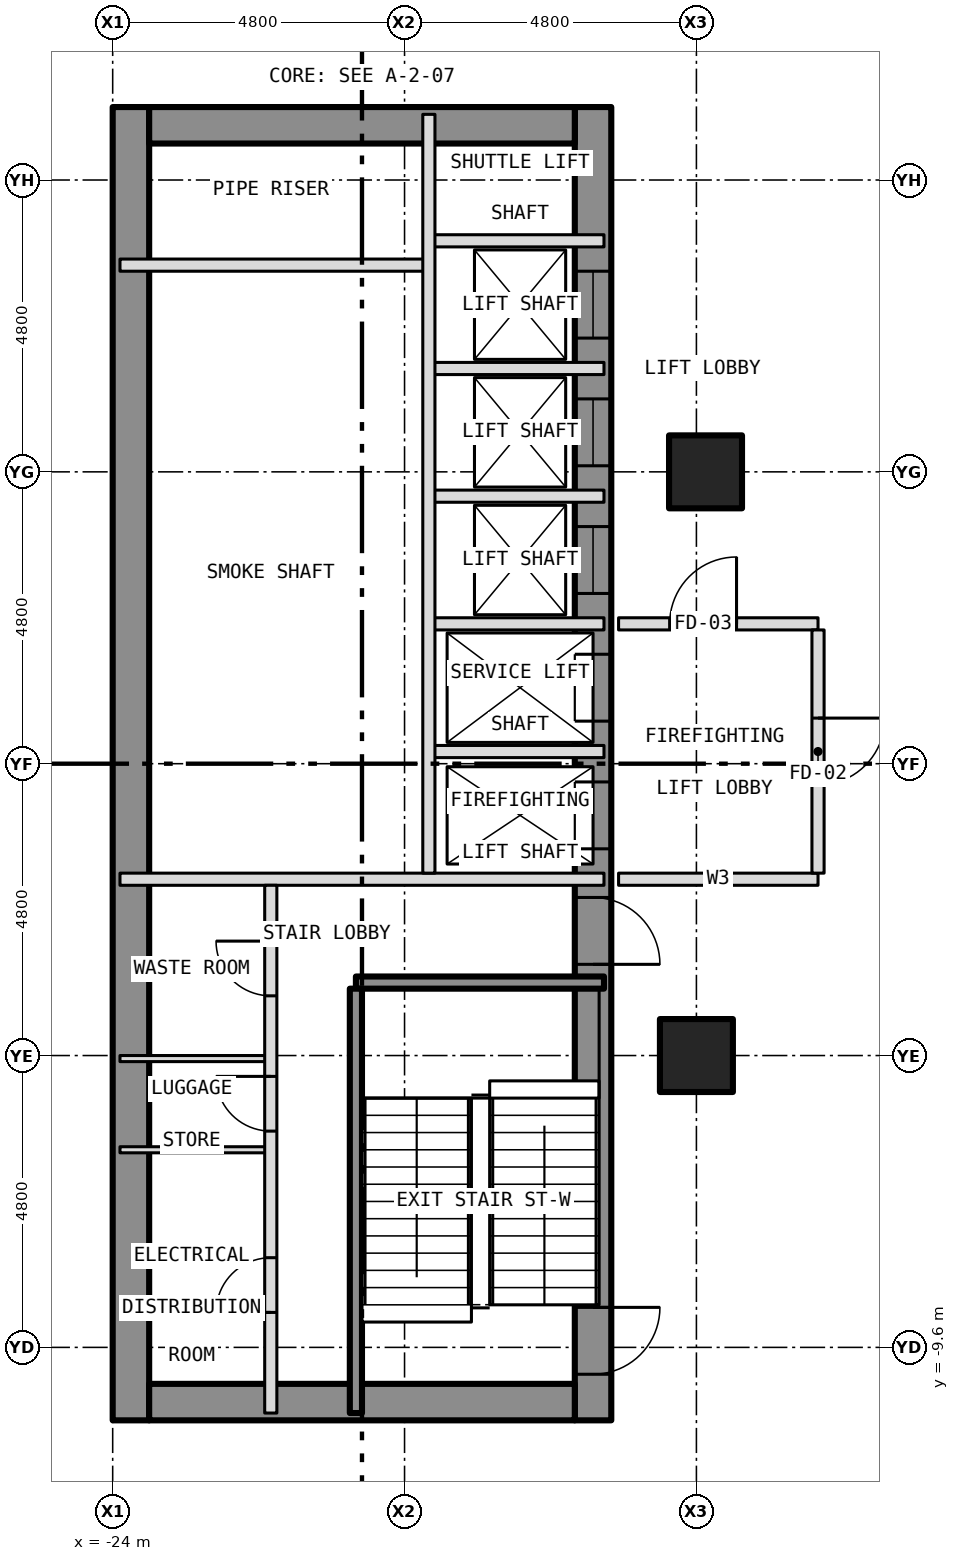
"""IFC4 building model, lengths in metres.
Left out: names, types, materials, properties, quantities, classifications, styles, units other than length and angle.
Written with IfcOpenShell. Run it as: python <this file> out.ifc"""

import sys

from ifc_helpers import new_model, si_unit, direction, frame, frame_2d, origin, origin_2d, place, context, subcontext, project, spatial, rectangle, hollow_rectangle, extrude, element, fill, save


model = new_model("IFC4")
c1 = context("Model", 3, precision=1e-05, world=origin(), true_north=direction((0.0, 1.0)))
c2 = subcontext(c1, "Body", "Model", "MODEL_VIEW")
j1 = project(units=[si_unit("LENGTHUNIT", "METRE"), si_unit("PLANEANGLEUNIT", "RADIAN")], contexts=[c1])
p1 = place(None, origin())
s1 = spatial("IfcSite", under=j1, at=p1, CompositionType="ELEMENT")
p2 = place(p1, origin())
s2 = spatial("IfcBuilding", under=s1, at=p2, CompositionType="ELEMENT")
p3 = place(p2, frame((0.0, 0.0, 24.5)))
s3 = spatial("IfcBuildingStorey", under=s2, at=p3, CompositionType="ELEMENT", Elevation=24.5)
for number, where, z_axis, x_axis in (
    (1, (-14.4, -4.8, -0.2), (0.0, 0.0, 1.0), (1.0, 0.0, 0.0)),
    (2, (-14.25, 4.8, -0.2), (0.0, 0.0, 1.0), (1.0, 0.0, 0.0)),
):
    element("IfcColumn", number, at=place(p3, frame(where, z_axis=z_axis, x_axis=x_axis)), inside=s3, PredefinedType="COLUMN", context=c2, shape_type="SweptSolid", body=[
        extrude(hollow_rectangle(XDim=1.2, YDim=1.2, WallThickness=0.07, at=origin_2d()), origin(), (0.0, 0.0, 1.0), 4.5),
    ])
p4 = place(p3, frame((-16.1, -10.8, 0.0), z_axis=(0.0, 0.0, 1.0), x_axis=(0.0, 1.0, 0.0)))
e3 = element("IfcWall", 3, at=p4, inside=s3, PredefinedType="SHEAR", context=c2, shape_type="SweptSolid", body=[
    extrude(rectangle(XDim=21.6, YDim=0.6, at=frame_2d((10.8, 0.0))), origin(), (0.0, 0.0, 1.0), 4.2),
])
p5 = place(p4, frame((9.4, 0.0, 0.0)))
e4 = element("IfcOpeningElement", 4, at=p5, cuts=e3, PredefinedType="OPENING", context=c2, shape_type="SweptSolid", body=[
    extrude(rectangle(XDim=1.1, YDim=2.1, at=frame_2d((0.55, 1.05))), frame((0.0, 0.312, 0.0), z_axis=(0.0, -1.0, 0.0), x_axis=(1.0, 0.0, 0.0)), (0.0, 0.0, 1.0), 0.624),
])
p6 = place(p4, frame((11.5, 0.0, 0.0)))
e5 = element("IfcOpeningElement", 5, at=p6, cuts=e3, PredefinedType="OPENING", context=c2, shape_type="SweptSolid", body=[
    extrude(rectangle(XDim=1.1, YDim=2.1, at=frame_2d((0.55, 1.05))), frame((0.0, 0.312, 0.0), z_axis=(0.0, -1.0, 0.0), x_axis=(1.0, 0.0, 0.0)), (0.0, 0.0, 1.0), 0.624),
])
p7 = place(p4, frame((13.6, 0.0, 0.0)))
e6 = element("IfcOpeningElement", 6, at=p7, cuts=e3, PredefinedType="OPENING", context=c2, shape_type="SweptSolid", body=[
    extrude(rectangle(XDim=1.1, YDim=2.1, at=frame_2d((0.55, 1.05))), frame((0.0, 0.312, 0.0), z_axis=(0.0, -1.0, 0.0), x_axis=(1.0, 0.0, 0.0)), (0.0, 0.0, 1.0), 0.624),
])
p8 = place(p4, frame((15.7, 0.0, 0.0)))
e7 = element("IfcOpeningElement", 7, at=p8, cuts=e3, PredefinedType="OPENING", context=c2, shape_type="SweptSolid", body=[
    extrude(rectangle(XDim=1.1, YDim=2.1, at=frame_2d((0.55, 1.05))), frame((0.0, 0.312, 0.0), z_axis=(0.0, -1.0, 0.0), x_axis=(1.0, 0.0, 0.0)), (0.0, 0.0, 1.0), 0.624),
])
p9 = place(p4, frame((17.8, 0.0, 0.0)))
e8 = element("IfcOpeningElement", 8, at=p9, cuts=e3, PredefinedType="OPENING", context=c2, shape_type="SweptSolid", body=[
    extrude(rectangle(XDim=1.1, YDim=2.1, at=frame_2d((0.55, 1.05))), frame((0.0, 0.312, 0.0), z_axis=(0.0, -1.0, 0.0), x_axis=(1.0, 0.0, 0.0)), (0.0, 0.0, 1.0), 0.624),
])
p10 = place(p4, frame((0.758, 0.0, 0.0)))
e9 = element("IfcOpeningElement", 9, at=p10, cuts=e3, PredefinedType="OPENING", context=c2, shape_type="SweptSolid", body=[
    extrude(rectangle(XDim=1.1, YDim=2.1, at=frame_2d((0.55, 1.05))), frame((0.0, 0.312, 0.0), z_axis=(0.0, -1.0, 0.0), x_axis=(1.0, 0.0, 0.0)), (0.0, 0.0, 1.0), 0.624),
])
p11 = place(p4, frame((7.5, 0.0, 0.0)))
e10 = element("IfcOpeningElement", 10, at=p11, cuts=e3, PredefinedType="OPENING", context=c2, shape_type="SweptSolid", body=[
    extrude(rectangle(XDim=1.1, YDim=2.1, at=frame_2d((0.55, 1.05))), frame((0.0, 0.312, 0.0), z_axis=(0.0, -1.0, 0.0), x_axis=(1.0, 0.0, 0.0)), (0.0, 0.0, 1.0), 0.624),
])
p12 = place(p3, frame((-23.7, -10.8, 0.0), z_axis=(0.0, 0.0, 1.0), x_axis=(0.0, 1.0, 0.0)))
e11 = element("IfcWall", 11, at=p12, inside=s3, PredefinedType="SHEAR", context=c2, shape_type="SweptSolid", body=[
    extrude(rectangle(XDim=21.6, YDim=0.6, at=frame_2d((10.8, 0.0))), origin(), (0.0, 0.0, 1.0), 4.2),
])
for number, where, z_axis, x_axis in (
    (12, (-23.4, 10.5, 0.0), (0.0, 0.0, 1.0), (1.0, 0.0, 0.0)),
    (13, (-23.4, -10.5, 0.0), (0.0, 0.0, 1.0), (1.0, 0.0, 0.0)),
):
    element("IfcWall", number, at=place(p3, frame(where, z_axis=z_axis, x_axis=x_axis)), inside=s3, PredefinedType="SHEAR", context=c2, shape_type="SweptSolid", body=[
        extrude(rectangle(XDim=7.0, YDim=0.6, at=frame_2d((3.5, 0.0))), origin(), (0.0, 0.0, 1.0), 4.2),
    ])
for number, where, z_axis, x_axis in (
    (14, (-23.88, -6.35, 0.0), (0.0, 0.0, 1.0), (1.0, 0.0, 0.0)),
    (15, (-23.88, -4.85, 0.0), (0.0, 0.0, 1.0), (1.0, 0.0, 0.0)),
):
    element("IfcWall", number, at=place(p3, frame(where, z_axis=z_axis, x_axis=x_axis)), inside=s3, PredefinedType="PARTITIONING", context=c2, shape_type="SweptSolid", body=[
        extrude(rectangle(XDim=2.48, YDim=0.1, at=frame_2d((1.24, 0.0))), origin(), (0.0, 0.0, 1.0), 4.2),
    ])
p13 = place(p3, frame((-20.0, -3.6, 0.0), z_axis=(0.0, 0.0, 1.0), x_axis=(1.0, 0.0, 0.0)))
e16 = element("IfcWall", 16, at=p13, inside=s3, PredefinedType="SHEAR", context=c2, shape_type="SweptSolid", body=[
    extrude(rectangle(XDim=4.08, YDim=0.2, at=frame_2d((2.04, 0.0))), origin(), (0.0, 0.0, 1.0), 4.2),
])
p14 = place(p3, frame((-23.88, -1.9, 0.0), z_axis=(0.0, 0.0, 1.0), x_axis=(1.0, 0.0, 0.0)))
e17 = element("IfcWall", 17, at=p14, inside=s3, PredefinedType="PARTITIONING", context=c2, shape_type="SweptSolid", body=[
    extrude(rectangle(XDim=7.96, YDim=0.2, at=frame_2d((3.98, 0.0))), origin(), (0.0, 0.0, 1.0), 4.2),
])
p15 = place(p3, frame((-15.68, -1.9, 0.0), z_axis=(0.0, 0.0, 1.0), x_axis=(1.0, 0.0, 0.0)))
e18 = element("IfcWall", 18, at=p15, inside=s3, PredefinedType="PARTITIONING", context=c2, shape_type="SweptSolid", body=[
    extrude(rectangle(XDim=3.28, YDim=0.2, at=frame_2d((1.64, 0.0))), origin(), (0.0, 0.0, 1.0), 4.3),
])
for number, where, z_axis, x_axis in (
    (19, (-18.8, 0.2, 0.0), (0.0, 0.0, 1.0), (1.0, 0.0, 0.0)),
    (20, (-18.8, 2.3, 0.0), (0.0, 0.0, 1.0), (1.0, 0.0, 0.0)),
):
    element("IfcWall", number, at=place(p3, frame(where, z_axis=z_axis, x_axis=x_axis)), inside=s3, PredefinedType="PARTITIONING", context=c2, shape_type="SweptSolid", body=[
        extrude(rectangle(XDim=2.88, YDim=0.2, at=frame_2d((1.44, 0.0))), origin(), (0.0, 0.0, 1.0), 4.2),
    ])
p16 = place(p3, frame((-15.68, 2.3, 0.0), z_axis=(0.0, 0.0, 1.0), x_axis=(1.0, 0.0, 0.0)))
e21 = element("IfcWall", 21, at=p16, inside=s3, PredefinedType="PARTITIONING", context=c2, shape_type="SweptSolid", body=[
    extrude(rectangle(XDim=3.28, YDim=0.2, at=frame_2d((1.64, 0.0))), origin(), (0.0, 0.0, 1.0), 4.3),
])
p17 = place(p16, frame((0.84, 0.0, 0.0)))
e22 = element("IfcOpeningElement", 22, at=p17, cuts=e21, PredefinedType="OPENING", context=c2, shape_type="SweptSolid", body=[
    extrude(rectangle(XDim=1.1, YDim=2.1, at=frame_2d((0.55, 1.05))), frame((0.0, 0.112, 0.0), z_axis=(0.0, -1.0, 0.0), x_axis=(1.0, 0.0, 0.0)), (0.0, 0.0, 1.0), 0.224),
])
for number, where, z_axis, x_axis in (
    (23, (-18.8, 4.4, 0.0), (0.0, 0.0, 1.0), (1.0, 0.0, 0.0)),
    (24, (-18.8, 6.5, 0.0), (0.0, 0.0, 1.0), (1.0, 0.0, 0.0)),
):
    element("IfcWall", number, at=place(p3, frame(where, z_axis=z_axis, x_axis=x_axis)), inside=s3, PredefinedType="PARTITIONING", context=c2, shape_type="SweptSolid", body=[
        extrude(rectangle(XDim=2.88, YDim=0.2, at=frame_2d((1.44, 0.0))), origin(), (0.0, 0.0, 1.0), 4.2),
    ])
p18 = place(p3, frame((-23.88, 8.2, 0.0), z_axis=(0.0, 0.0, 1.0), x_axis=(1.0, 0.0, 0.0)))
e25 = element("IfcWall", 25, at=p18, inside=s3, PredefinedType="PARTITIONING", context=c2, shape_type="SweptSolid", body=[
    extrude(rectangle(XDim=5.08, YDim=0.2, at=frame_2d((2.54, 0.0))), origin(), (0.0, 0.0, 1.0), 4.2),
])
p19 = place(p3, frame((-18.8, 8.6, 0.0), z_axis=(0.0, 0.0, 1.0), x_axis=(1.0, 0.0, 0.0)))
e26 = element("IfcWall", 26, at=p19, inside=s3, PredefinedType="PARTITIONING", context=c2, shape_type="SweptSolid", body=[
    extrude(rectangle(XDim=2.88, YDim=0.2, at=frame_2d((1.44, 0.0))), origin(), (0.0, 0.0, 1.0), 4.2),
])
p20 = place(p3, frame((-21.4, -10.68, 0.0), z_axis=(0.0, 0.0, 1.0), x_axis=(0.0, 1.0, 0.0)))
e27 = element("IfcWall", 27, at=p20, inside=s3, PredefinedType="PARTITIONING", context=c2, shape_type="SweptSolid", body=[
    extrude(rectangle(XDim=8.68, YDim=0.2, at=frame_2d((4.34, 0.0))), origin(), (0.0, 0.0, 1.0), 4.2),
])
p21 = place(p20, frame((1.655, 0.0, 0.0)))
e28 = element("IfcOpeningElement", 28, at=p21, cuts=e27, PredefinedType="OPENING", context=c2, shape_type="SweptSolid", body=[
    extrude(rectangle(XDim=0.9, YDim=2.1, at=frame_2d((0.45, 1.05))), frame((0.0, 0.112, 0.0), z_axis=(0.0, -1.0, 0.0), x_axis=(1.0, 0.0, 0.0)), (0.0, 0.0, 1.0), 0.224),
])
p22 = place(p20, frame((4.637, 0.0, 0.0)))
e29 = element("IfcOpeningElement", 29, at=p22, cuts=e27, PredefinedType="OPENING", context=c2, shape_type="SweptSolid", body=[
    extrude(rectangle(XDim=0.9, YDim=2.1, at=frame_2d((0.45, 1.05))), frame((0.0, 0.112, 0.0), z_axis=(0.0, -1.0, 0.0), x_axis=(1.0, 0.0, 0.0)), (0.0, 0.0, 1.0), 0.224),
])
p23 = place(p20, frame((6.862, 0.0, 0.0)))
e30 = element("IfcOpeningElement", 30, at=p23, cuts=e27, PredefinedType="OPENING", context=c2, shape_type="SweptSolid", body=[
    extrude(rectangle(XDim=0.9, YDim=2.1, at=frame_2d((0.45, 1.05))), frame((0.0, 0.112, 0.0), z_axis=(0.0, -1.0, 0.0), x_axis=(1.0, 0.0, 0.0)), (0.0, 0.0, 1.0), 0.224),
])
p24 = place(p3, frame((-20.0, -10.68, 0.0), z_axis=(0.0, 0.0, 1.0), x_axis=(0.0, 1.0, 0.0)))
e31 = element("IfcWall", 31, at=p24, inside=s3, PredefinedType="SHEAR", context=c2, shape_type="SweptSolid", body=[
    extrude(rectangle(XDim=6.98, YDim=0.2, at=frame_2d((3.49, 0.0))), origin(), (0.0, 0.0, 1.0), 4.2),
])
p25 = place(p3, frame((-18.8, -1.8, 0.0), z_axis=(0.0, 0.0, 1.0), x_axis=(0.0, 1.0, 0.0)))
e32 = element("IfcWall", 32, at=p25, inside=s3, PredefinedType="PARTITIONING", context=c2, shape_type="SweptSolid", body=[
    extrude(rectangle(XDim=12.48, YDim=0.2, at=frame_2d((6.24, 0.0))), origin(), (0.0, 0.0, 1.0), 4.2),
])
p26 = place(p3, frame((-12.4, -1.8, 0.0), z_axis=(0.0, 0.0, 1.0), x_axis=(0.0, 1.0, 0.0)))
e33 = element("IfcWall", 33, at=p26, inside=s3, PredefinedType="PARTITIONING", context=c2, shape_type="SweptSolid", body=[
    extrude(rectangle(XDim=4.0, YDim=0.2, at=frame_2d((2.0, 0.0))), origin(), (0.0, 0.0, 1.0), 4.3),
])
p27 = place(p26, frame((1.45, 0.0, 0.0)))
e34 = element("IfcOpeningElement", 34, at=p27, cuts=e33, PredefinedType="OPENING", context=c2, shape_type="SweptSolid", body=[
    extrude(rectangle(XDim=1.1, YDim=2.1, at=frame_2d((0.55, 1.05))), frame((0.0, 0.112, 0.0), z_axis=(0.0, -1.0, 0.0), x_axis=(1.0, 0.0, 0.0)), (0.0, 0.0, 1.0), 0.224),
])
p28 = place(p5, origin())
e35 = element("IfcDoor", 35, at=p28, inside=s3, OperationType="SLIDING_TO_LEFT", PredefinedType="DOOR", context=c2, shape_type="SweptSolid", body=[
    extrude(rectangle(XDim=1.1, YDim=2.1, at=frame_2d((0.55, 1.05))), frame((0.0, 0.025, 0.0), z_axis=(0.0, -1.0, 0.0), x_axis=(1.0, 0.0, 0.0)), (0.0, 0.0, 1.0), 0.05),
])
fill(e4, e35)
p29 = place(p6, origin())
e36 = element("IfcDoor", 36, at=p29, inside=s3, OperationType="SLIDING_TO_LEFT", PredefinedType="DOOR", context=c2, shape_type="SweptSolid", body=[
    extrude(rectangle(XDim=1.1, YDim=2.1, at=frame_2d((0.55, 1.05))), frame((0.0, 0.025, 0.0), z_axis=(0.0, -1.0, 0.0), x_axis=(1.0, 0.0, 0.0)), (0.0, 0.0, 1.0), 0.05),
])
fill(e5, e36)
p30 = place(p7, origin())
e37 = element("IfcDoor", 37, at=p30, inside=s3, OperationType="SLIDING_TO_LEFT", PredefinedType="DOOR", context=c2, shape_type="SweptSolid", body=[
    extrude(rectangle(XDim=1.1, YDim=2.1, at=frame_2d((0.55, 1.05))), frame((0.0, 0.025, 0.0), z_axis=(0.0, -1.0, 0.0), x_axis=(1.0, 0.0, 0.0)), (0.0, 0.0, 1.0), 0.05),
])
fill(e6, e37)
p31 = place(p8, origin())
e38 = element("IfcDoor", 38, at=p31, inside=s3, OperationType="SLIDING_TO_LEFT", PredefinedType="DOOR", context=c2, shape_type="SweptSolid", body=[
    extrude(rectangle(XDim=1.1, YDim=2.1, at=frame_2d((0.55, 1.05))), frame((0.0, 0.025, 0.0), z_axis=(0.0, -1.0, 0.0), x_axis=(1.0, 0.0, 0.0)), (0.0, 0.0, 1.0), 0.05),
])
fill(e7, e38)
p32 = place(p9, origin())
e39 = element("IfcDoor", 39, at=p32, inside=s3, OperationType="SLIDING_TO_LEFT", PredefinedType="DOOR", context=c2, shape_type="SweptSolid", body=[
    extrude(rectangle(XDim=1.1, YDim=2.1, at=frame_2d((0.55, 1.05))), frame((0.0, 0.025, 0.0), z_axis=(0.0, -1.0, 0.0), x_axis=(1.0, 0.0, 0.0)), (0.0, 0.0, 1.0), 0.05),
])
fill(e8, e39)
p33 = place(p10, origin())
e40 = element("IfcDoor", 40, at=p33, inside=s3, OperationType="SINGLE_SWING_RIGHT", PredefinedType="DOOR", context=c2, shape_type="SweptSolid", body=[
    extrude(rectangle(XDim=1.1, YDim=2.1, at=frame_2d((0.55, 1.05))), frame((0.0, 0.025, 0.0), z_axis=(0.0, -1.0, 0.0), x_axis=(1.0, 0.0, 0.0)), (0.0, 0.0, 1.0), 0.05),
])
fill(e9, e40)
p34 = place(p11, origin())
e41 = element("IfcDoor", 41, at=p34, inside=s3, OperationType="SINGLE_SWING_LEFT", PredefinedType="DOOR", context=c2, shape_type="SweptSolid", body=[
    extrude(rectangle(XDim=1.1, YDim=2.1, at=frame_2d((0.55, 1.05))), frame((0.0, 0.025, 0.0), z_axis=(0.0, -1.0, 0.0), x_axis=(1.0, 0.0, 0.0)), (0.0, 0.0, 1.0), 0.05),
])
fill(e10, e41)
p35 = place(p21, origin())
e42 = element("IfcDoor", 42, at=p35, inside=s3, OperationType="SINGLE_SWING_LEFT", PredefinedType="DOOR", context=c2, shape_type="SweptSolid", body=[
    extrude(rectangle(XDim=0.9, YDim=2.1, at=frame_2d((0.45, 1.05))), frame((0.0, 0.025, 0.0), z_axis=(0.0, -1.0, 0.0), x_axis=(1.0, 0.0, 0.0)), (0.0, 0.0, 1.0), 0.05),
])
fill(e28, e42)
p36 = place(p22, origin())
e43 = element("IfcDoor", 43, at=p36, inside=s3, OperationType="SINGLE_SWING_RIGHT", PredefinedType="DOOR", context=c2, shape_type="SweptSolid", body=[
    extrude(rectangle(XDim=0.9, YDim=2.1, at=frame_2d((0.45, 1.05))), frame((0.0, 0.025, 0.0), z_axis=(0.0, -1.0, 0.0), x_axis=(1.0, 0.0, 0.0)), (0.0, 0.0, 1.0), 0.05),
])
fill(e29, e43)
p37 = place(p23, origin())
e44 = element("IfcDoor", 44, at=p37, inside=s3, OperationType="SINGLE_SWING_RIGHT", PredefinedType="DOOR", context=c2, shape_type="SweptSolid", body=[
    extrude(rectangle(XDim=0.9, YDim=2.1, at=frame_2d((0.45, 1.05))), frame((0.0, 0.025, 0.0), z_axis=(0.0, -1.0, 0.0), x_axis=(1.0, 0.0, 0.0)), (0.0, 0.0, 1.0), 0.05),
])
fill(e30, e44)
p38 = place(p27, origin())
e45 = element("IfcDoor", 45, at=p38, inside=s3, OperationType="SINGLE_SWING_RIGHT", PredefinedType="DOOR", context=c2, shape_type="SweptSolid", body=[
    extrude(rectangle(XDim=1.1, YDim=2.1, at=frame_2d((0.55, 1.05))), frame((0.0, 0.025, 0.0), z_axis=(0.0, -1.0, 0.0), x_axis=(1.0, 0.0, 0.0)), (0.0, 0.0, 1.0), 0.05),
])
fill(e34, e45)
p39 = place(p17, origin())
e46 = element("IfcDoor", 46, at=p39, inside=s3, OperationType="SINGLE_SWING_RIGHT", PredefinedType="DOOR", context=c2, shape_type="SweptSolid", body=[
    extrude(rectangle(XDim=1.1, YDim=2.1, at=frame_2d((0.55, 1.05))), frame((0.0, 0.025, 0.0), z_axis=(0.0, -1.0, 0.0), x_axis=(1.0, 0.0, 0.0)), (0.0, 0.0, 1.0), 0.05),
])
fill(e22, e46)
save(model, sys.argv[1])
